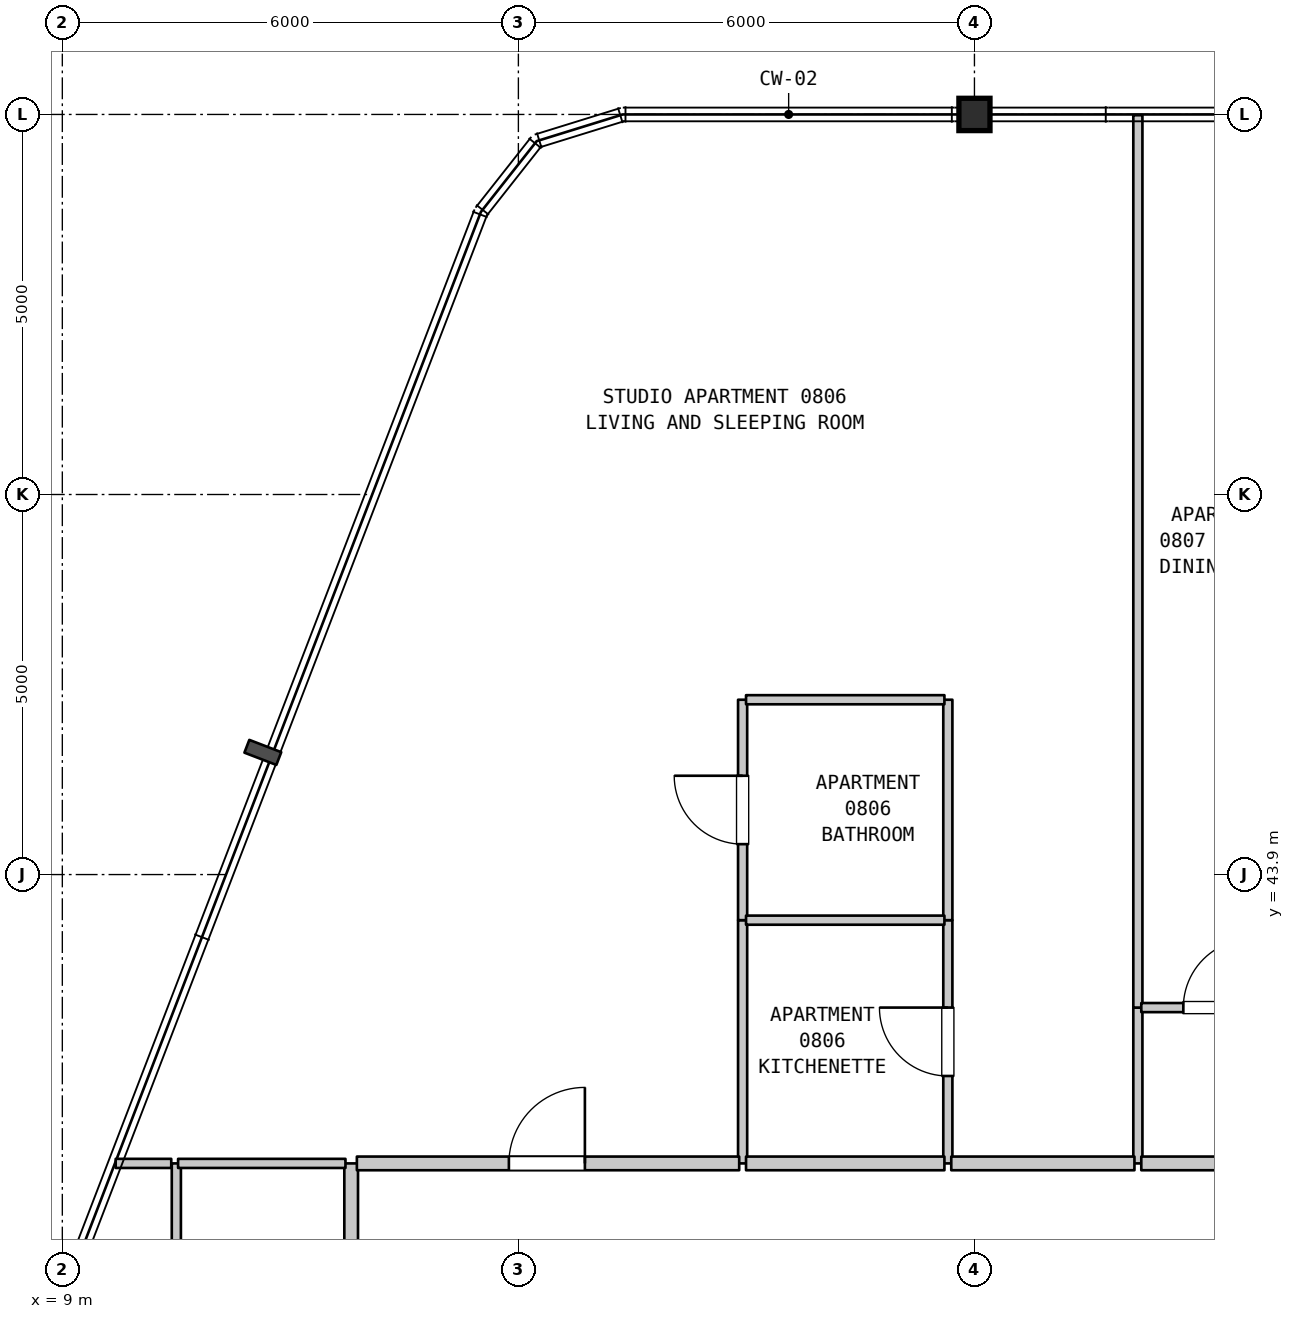
"""IFC4 building model, lengths in metres.
Left out: names, types, materials, properties, quantities, classifications, styles, units other than length and angle.
Written with IfcOpenShell. Run it as: python <this file> out.ifc"""

import sys

from ifc_helpers import new_model, si_unit, direction, frame, frame_2d, origin, origin_2d, place, context, subcontext, project, spatial, rectangle, i_section, extrude, element, fill, save


model = new_model("IFC4")
c1 = context("Model", 3, precision=1e-05, world=origin(), true_north=direction((0.0, 1.0)))
c2 = subcontext(c1, "Body", "Model", "MODEL_VIEW")
j1 = project(units=[si_unit("LENGTHUNIT", "METRE"), si_unit("PLANEANGLEUNIT", "RADIAN")], contexts=[c1])
p1 = place(None, origin())
s1 = spatial("IfcSite", under=j1, at=p1, CompositionType="ELEMENT")
p2 = place(p1, origin())
s2 = spatial("IfcBuilding", under=s1, at=p2, CompositionType="ELEMENT")
p3 = place(p2, frame((0.0, 0.0, 38.8)))
s3 = spatial("IfcBuildingStorey", under=s2, at=p3, CompositionType="ELEMENT", Elevation=38.8)
p4 = place(p3, frame((21.0, 53.9, 0.0), z_axis=(0.0, 0.0, 1.0), x_axis=(1.0, 0.0, 0.0)))
e1 = element("IfcColumn", 1, at=p4, inside=s3, PredefinedType="COLUMN", context=c2, shape_type="SweptSolid", body=[
    extrude(i_section(OverallWidth=0.409, OverallDepth=0.425, WebThickness=0.032, FlangeThickness=0.052, FilletRadius=0.015, at=origin_2d()), origin(), (0.0, 0.0, 1.0), 3.7),
])
p5 = place(p3, frame((10.5, 31.45, 0.0), z_axis=(0.0, 0.0, 1.0), x_axis=(0.0, 1.0, 0.0)))
e2 = element("IfcWall", 2, at=p5, inside=s3, PredefinedType="PARTITIONING", context=c2, shape_type="SweptSolid", body=[
    extrude(rectangle(XDim=8.65, YDim=0.12, at=frame_2d((4.325, 0.0))), origin(), (0.0, 0.0, 1.0), 3.385),
])
p6 = place(p3, frame((12.8, 31.45, 0.0), z_axis=(0.0, 0.0, 1.0), x_axis=(0.0, 1.0, 0.0)))
e3 = element("IfcWall", 3, at=p6, inside=s3, PredefinedType="STANDARD", context=c2, shape_type="SweptSolid", body=[
    extrude(rectangle(XDim=8.65, YDim=0.18, at=frame_2d((4.325, 0.0))), origin(), (0.0, 0.0, 1.0), 3.385),
])
p7 = place(p3, frame((17.95, 40.1, 0.0), z_axis=(0.0, 0.0, 1.0), x_axis=(0.0, 1.0, 0.0)))
e4 = element("IfcWall", 4, at=p7, inside=s3, PredefinedType="PARTITIONING", context=c2, shape_type="SweptSolid", body=[
    extrude(rectangle(XDim=3.2, YDim=0.12, at=frame_2d((1.6, 0.0))), origin(), (0.0, 0.0, 1.0), 3.385),
])
p8 = place(p3, frame((17.95, 43.3, 0.0), z_axis=(0.0, 0.0, 1.0), x_axis=(0.0, 1.0, 0.0)))
e5 = element("IfcWall", 5, at=p8, inside=s3, PredefinedType="PARTITIONING", context=c2, shape_type="SweptSolid", body=[
    extrude(rectangle(XDim=2.9, YDim=0.12, at=frame_2d((1.45, 0.0))), origin(), (0.0, 0.0, 1.0), 3.385),
])
p9 = place(p8, frame((1.0, 0.0, 0.0)))
e6 = element("IfcOpeningElement", 6, at=p9, cuts=e5, PredefinedType="OPENING", context=c2, shape_type="SweptSolid", body=[
    extrude(rectangle(XDim=0.9, YDim=2.1, at=frame_2d((0.45, 1.05))), frame((0.0, 0.07, 0.0), z_axis=(0.0, -1.0, 0.0), x_axis=(1.0, 0.0, 0.0)), (0.0, 0.0, 1.0), 0.14),
])
p10 = place(p3, frame((20.65, 40.1, 0.0), z_axis=(0.0, 0.0, 1.0), x_axis=(0.0, 1.0, 0.0)))
e7 = element("IfcWall", 7, at=p10, inside=s3, PredefinedType="PARTITIONING", context=c2, shape_type="SweptSolid", body=[
    extrude(rectangle(XDim=3.2, YDim=0.12, at=frame_2d((1.6, 0.0))), origin(), (0.0, 0.0, 1.0), 3.385),
])
p11 = place(p10, frame((1.15, 0.0, 0.0)))
e8 = element("IfcOpeningElement", 8, at=p11, cuts=e7, PredefinedType="OPENING", context=c2, shape_type="SweptSolid", body=[
    extrude(rectangle(XDim=0.9, YDim=2.15, at=frame_2d((0.45, 1.075))), frame((0.0, 0.07, 0.0), z_axis=(0.0, -1.0, 0.0), x_axis=(1.0, 0.0, 0.0)), (0.0, 0.0, 1.0), 0.14),
])
p12 = place(p3, frame((20.65, 43.3, 0.0), z_axis=(0.0, 0.0, 1.0), x_axis=(0.0, 1.0, 0.0)))
e9 = element("IfcWall", 9, at=p12, inside=s3, PredefinedType="PARTITIONING", context=c2, shape_type="SweptSolid", body=[
    extrude(rectangle(XDim=2.9, YDim=0.12, at=frame_2d((1.45, 0.0))), origin(), (0.0, 0.0, 1.0), 3.385),
])
p13 = place(p3, frame((23.15, 40.1, 0.0), z_axis=(0.0, 0.0, 1.0), x_axis=(0.0, 1.0, 0.0)))
e10 = element("IfcWall", 10, at=p13, inside=s3, PredefinedType="PARTITIONING", context=c2, shape_type="SweptSolid", body=[
    extrude(rectangle(XDim=2.05, YDim=0.12, at=frame_2d((1.025, 0.0))), origin(), (0.0, 0.0, 1.0), 3.385),
])
p14 = place(p3, frame((23.15, 42.15, 0.0), z_axis=(0.0, 0.0, 1.0), x_axis=(0.0, 1.0, 0.0)))
e11 = element("IfcWall", 11, at=p14, inside=s3, PredefinedType="PARTITIONING", context=c2, shape_type="SweptSolid", body=[
    extrude(rectangle(XDim=11.74, YDim=0.12, at=frame_2d((5.87, 0.0))), origin(), (0.0, 0.0, 1.0), 3.385),
])
p15 = place(p3, frame((9.702, 40.1, 0.0), z_axis=(0.0, 0.0, 1.0), x_axis=(1.0, 0.0, 0.0)))
e12 = element("IfcWall", 12, at=p15, inside=s3, PredefinedType="PARTITIONING", context=c2, shape_type="SweptSolid", body=[
    extrude(rectangle(XDim=0.731, YDim=0.12, at=frame_2d((0.366, 0.0))), origin(), (0.0, 0.0, 1.0), 3.385),
])
p16 = place(p3, frame((10.523, 40.1, 0.0), z_axis=(0.0, 0.0, 1.0), x_axis=(1.0, 0.0, 0.0)))
e13 = element("IfcWall", 13, at=p16, inside=s3, PredefinedType="PARTITIONING", context=c2, shape_type="SweptSolid", body=[
    extrude(rectangle(XDim=2.202, YDim=0.12, at=frame_2d((1.101, 0.0))), origin(), (0.0, 0.0, 1.0), 3.385),
])
p17 = place(p3, frame((12.875, 40.1, 0.0), z_axis=(0.0, 0.0, 1.0), x_axis=(1.0, 0.0, 0.0)))
e14 = element("IfcWall", 14, at=p17, inside=s3, PredefinedType="STANDARD", context=c2, shape_type="SweptSolid", body=[
    extrude(rectangle(XDim=5.03, YDim=0.18, at=frame_2d((2.515, 0.0))), origin(), (0.0, 0.0, 1.0), 3.385),
])
p18 = place(p17, frame((2.0, 0.0, 0.0)))
e15 = element("IfcOpeningElement", 15, at=p18, cuts=e14, PredefinedType="OPENING", context=c2, shape_type="SweptSolid", body=[
    extrude(rectangle(XDim=1.0, YDim=2.15, at=frame_2d((0.5, 1.075))), frame((0.0, 0.1, 0.0), z_axis=(0.0, -1.0, 0.0), x_axis=(1.0, 0.0, 0.0)), (0.0, 0.0, 1.0), 0.2),
])
p19 = place(p3, frame((17.995, 40.1, 0.0), z_axis=(0.0, 0.0, 1.0), x_axis=(1.0, 0.0, 0.0)))
e16 = element("IfcWall", 16, at=p19, inside=s3, PredefinedType="STANDARD", context=c2, shape_type="SweptSolid", body=[
    extrude(rectangle(XDim=2.61, YDim=0.18, at=frame_2d((1.305, 0.0))), origin(), (0.0, 0.0, 1.0), 3.385),
])
p20 = place(p3, frame((20.695, 40.1, 0.0), z_axis=(0.0, 0.0, 1.0), x_axis=(1.0, 0.0, 0.0)))
e17 = element("IfcWall", 17, at=p20, inside=s3, PredefinedType="STANDARD", context=c2, shape_type="SweptSolid", body=[
    extrude(rectangle(XDim=2.41, YDim=0.18, at=frame_2d((1.205, 0.0))), origin(), (0.0, 0.0, 1.0), 3.385),
])
p21 = place(p3, frame((23.195, 40.1, 0.0), z_axis=(0.0, 0.0, 1.0), x_axis=(1.0, 0.0, 0.0)))
e18 = element("IfcWall", 18, at=p21, inside=s3, PredefinedType="STANDARD", context=c2, shape_type="SweptSolid", body=[
    extrude(rectangle(XDim=5.04, YDim=0.18, at=frame_2d((2.52, 0.0))), origin(), (0.0, 0.0, 1.0), 3.385),
])
p22 = place(p21, frame((1.75, 0.0, 0.0)))
e19 = element("IfcOpeningElement", 19, at=p22, cuts=e18, PredefinedType="OPENING", context=c2, shape_type="SweptSolid", body=[
    extrude(rectangle(XDim=1.0, YDim=2.15, at=frame_2d((0.5, 1.075))), frame((0.0, 0.1, 0.0), z_axis=(0.0, -1.0, 0.0), x_axis=(1.0, 0.0, 0.0)), (0.0, 0.0, 1.0), 0.2),
])
p23 = place(p3, frame((23.195, 42.15, 0.0), z_axis=(0.0, 0.0, 1.0), x_axis=(1.0, 0.0, 0.0)))
e20 = element("IfcWall", 20, at=p23, inside=s3, PredefinedType="PARTITIONING", context=c2, shape_type="SweptSolid", body=[
    extrude(rectangle(XDim=2.16, YDim=0.12, at=frame_2d((1.08, 0.0))), origin(), (0.0, 0.0, 1.0), 3.385),
])
p24 = place(p23, frame((0.553, 0.0, 0.0)))
e21 = element("IfcOpeningElement", 21, at=p24, cuts=e20, PredefinedType="OPENING", context=c2, shape_type="SweptSolid", body=[
    extrude(rectangle(XDim=0.9, YDim=2.15, at=frame_2d((0.45, 1.075))), frame((0.0, 0.07, 0.0), z_axis=(0.0, -1.0, 0.0), x_axis=(1.0, 0.0, 0.0)), (0.0, 0.0, 1.0), 0.14),
])
for number, where, z_axis, x_axis in (
    (22, (17.995, 43.3, 0.0), (0.0, 0.0, 1.0), (1.0, 0.0, 0.0)),
    (23, (17.995, 46.2, 0.0), (0.0, 0.0, 1.0), (1.0, 0.0, 0.0)),
):
    element("IfcWall", number, at=place(p3, frame(where, z_axis=z_axis, x_axis=x_axis)), inside=s3, PredefinedType="PARTITIONING", context=c2, shape_type="SweptSolid", body=[
        extrude(rectangle(XDim=2.61, YDim=0.12, at=frame_2d((1.305, 0.0))), origin(), (0.0, 0.0, 1.0), 3.385),
    ])
p25 = place(p9, origin())
e24 = element("IfcDoor", 24, at=p25, inside=s3, OperationType="SINGLE_SWING_RIGHT", PredefinedType="DOOR", context=c2, shape_type="SweptSolid", body=[
    extrude(rectangle(XDim=0.9, YDim=2.1, at=frame_2d((0.45, 1.05))), frame((0.0, 0.025, 0.0), z_axis=(0.0, -1.0, 0.0), x_axis=(1.0, 0.0, 0.0)), (0.0, 0.0, 1.0), 0.05),
])
fill(e6, e24)
p26 = place(p11, origin())
e25 = element("IfcDoor", 25, at=p26, inside=s3, OperationType="SINGLE_SWING_RIGHT", PredefinedType="DOOR", context=c2, shape_type="SweptSolid", body=[
    extrude(rectangle(XDim=0.9, YDim=2.15, at=frame_2d((0.45, 1.075))), frame((0.0, 0.025, 0.0), z_axis=(0.0, -1.0, 0.0), x_axis=(1.0, 0.0, 0.0)), (0.0, 0.0, 1.0), 0.05),
])
fill(e8, e25)
p27 = place(p18, origin())
e26 = element("IfcDoor", 26, at=p27, inside=s3, OperationType="SINGLE_SWING_RIGHT", PredefinedType="DOOR", context=c2, shape_type="SweptSolid", body=[
    extrude(rectangle(XDim=1.0, YDim=2.15, at=frame_2d((0.5, 1.075))), frame((0.0, 0.025, 0.0), z_axis=(0.0, -1.0, 0.0), x_axis=(1.0, 0.0, 0.0)), (0.0, 0.0, 1.0), 0.05),
])
fill(e15, e26)
p28 = place(p24, origin())
e27 = element("IfcDoor", 27, at=p28, inside=s3, OperationType="SINGLE_SWING_RIGHT", PredefinedType="DOOR", context=c2, shape_type="SweptSolid", body=[
    extrude(rectangle(XDim=0.9, YDim=2.15, at=frame_2d((0.45, 1.075))), frame((0.0, 0.025, 0.0), z_axis=(0.0, -1.0, 0.0), x_axis=(1.0, 0.0, 0.0)), (0.0, 0.0, 1.0), 0.05),
])
fill(e21, e27)
save(model, sys.argv[1])
